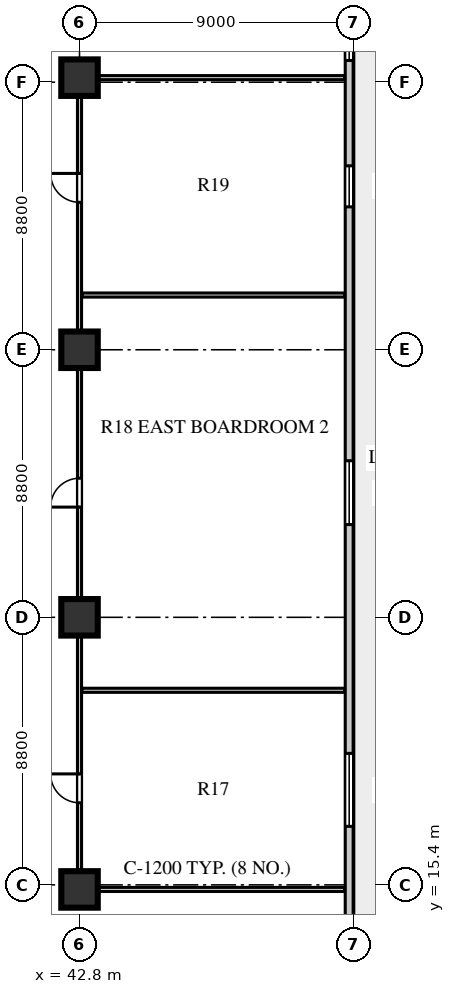
"""IFC4 building model, lengths in metres.
Left out: names, types, materials, properties, quantities, classifications, styles, units other than length and angle.
Written with IfcOpenShell. Run it as: python <this file> out.ifc"""

import sys

from ifc_helpers import new_model, si_unit, direction, frame, frame_2d, origin, origin_2d, place, context, subcontext, project, spatial, rectangle, extrude, element, fill, save


model = new_model("IFC4")
c1 = context("Model", 3, precision=1e-05, world=origin(), true_north=direction((0.0, 1.0)))
c2 = subcontext(c1, "Body", "Model", "MODEL_VIEW")
j1 = project(units=[si_unit("LENGTHUNIT", "METRE"), si_unit("PLANEANGLEUNIT", "RADIAN")], contexts=[c1])
p1 = place(None, origin())
s1 = spatial("IfcSite", under=j1, at=p1, CompositionType="ELEMENT")
p2 = place(p1, origin())
s2 = spatial("IfcBuilding", under=s1, at=p2, CompositionType="ELEMENT")
p3 = place(p2, frame((0.0, 0.0, 42.0)))
s3 = spatial("IfcBuildingStorey", under=s2, at=p3, CompositionType="ELEMENT", Elevation=42.0)
for number, where, z_axis, x_axis in (
    (1, (42.8, 15.25, 0.0), (0.0, 0.0, 1.0), (1.0, 0.0, 0.0)),
    (2, (42.8, 24.2, 0.0), (0.0, 0.0, 1.0), (1.0, 0.0, 0.0)),
    (3, (42.8, 33.0, 0.0), (0.0, 0.0, 1.0), (1.0, 0.0, 0.0)),
    (4, (42.8, 41.95, 0.0), (0.0, 0.0, 1.0), (1.0, 0.0, 0.0)),
):
    element("IfcColumn", number, at=place(p3, frame(where, z_axis=z_axis, x_axis=x_axis)), inside=s3, PredefinedType="COLUMN", context=c2, shape_type="SweptSolid", body=[
        extrude(rectangle(XDim=1.2, YDim=1.2, at=origin_2d()), origin(), (0.0, 0.0, 1.0), 3.72),
    ])
p4 = place(p3, frame((51.67, 12.36, 0.0), z_axis=(0.0, 0.0, 1.0), x_axis=(0.0, 1.0, 0.0)))
e5 = element("IfcWall", 5, at=p4, inside=s3, PredefinedType="SOLIDWALL", context=c2, shape_type="SweptSolid", body=[
    extrude(rectangle(XDim=32.48, YDim=0.26, at=frame_2d((16.24, 0.0))), origin(), (0.0, 0.0, 1.0), 3.72),
])
p5 = place(p4, frame((0.69, 0.0, 0.0)))
e6 = element("IfcOpeningElement", 6, at=p5, cuts=e5, PredefinedType="OPENING", context=c2, shape_type="SweptSolid", body=[
    extrude(rectangle(XDim=1.0, YDim=2.05, at=frame_2d((0.5, 1.025))), frame((0.0, 0.14, 0.0), z_axis=(0.0, -1.0, 0.0), x_axis=(1.0, 0.0, 0.0)), (0.0, 0.0, 1.0), 0.28),
])
p6 = place(p4, frame((4.965, 0.0, 0.8)))
e7 = element("IfcOpeningElement", 7, at=p6, cuts=e5, PredefinedType="OPENING", context=c2, shape_type="SweptSolid", body=[
    extrude(rectangle(XDim=2.4, YDim=2.05, at=frame_2d((1.2, 1.025))), frame((0.0, 0.14, 0.0), z_axis=(0.0, -1.0, 0.0), x_axis=(1.0, 0.0, 0.0)), (0.0, 0.0, 1.0), 0.28),
])
p7 = place(p4, frame((14.89, 0.0, 0.8)))
e8 = element("IfcOpeningElement", 8, at=p7, cuts=e5, PredefinedType="OPENING", context=c2, shape_type="SweptSolid", body=[
    extrude(rectangle(XDim=2.1, YDim=1.95, at=frame_2d((1.05, 0.975))), frame((0.0, 0.14, 0.0), z_axis=(0.0, -1.0, 0.0), x_axis=(1.0, 0.0, 0.0)), (0.0, 0.0, 1.0), 0.28),
])
p8 = place(p4, frame((25.34, 0.0, 0.8)))
e9 = element("IfcOpeningElement", 9, at=p8, cuts=e5, PredefinedType="OPENING", context=c2, shape_type="SweptSolid", body=[
    extrude(rectangle(XDim=1.35, YDim=1.9, at=frame_2d((0.675, 0.95))), frame((0.0, 0.14, 0.0), z_axis=(0.0, -1.0, 0.0), x_axis=(1.0, 0.0, 0.0)), (0.0, 0.0, 1.0), 0.28),
])
p9 = place(p4, frame((30.155, 0.0, 0.8)))
e10 = element("IfcOpeningElement", 10, at=p9, cuts=e5, PredefinedType="OPENING", context=c2, shape_type="SweptSolid", body=[
    extrude(rectangle(XDim=1.65, YDim=1.95, at=frame_2d((0.825, 0.975))), frame((0.0, 0.14, 0.0), z_axis=(0.0, -1.0, 0.0), x_axis=(1.0, 0.0, 0.0)), (0.0, 0.0, 1.0), 0.28),
])
p10 = place(p3, frame((42.8, 15.25, 0.0), z_axis=(0.0, 0.0, 1.0), x_axis=(0.0, 1.0, 0.0)))
e11 = element("IfcWall", 11, at=p10, inside=s3, PredefinedType="PARTITIONING", context=c2, shape_type="SweptSolid", body=[
    extrude(rectangle(XDim=26.7, YDim=0.135, at=frame_2d((13.35, 0.0))), origin(), (0.0, 0.0, 1.0), 3.02),
])
p11 = place(p10, frame((2.85, 0.0, 0.0)))
e12 = element("IfcOpeningElement", 12, at=p11, cuts=e11, PredefinedType="OPENING", context=c2, shape_type="SweptSolid", body=[
    extrude(rectangle(XDim=0.95, YDim=2.08, at=frame_2d((0.475, 1.04))), frame((0.0, 0.078, 0.0), z_axis=(0.0, -1.0, 0.0), x_axis=(1.0, 0.0, 0.0)), (0.0, 0.0, 1.0), 0.155),
])
p12 = place(p10, frame((12.575, 0.0, 0.0)))
e13 = element("IfcOpeningElement", 13, at=p12, cuts=e11, PredefinedType="OPENING", context=c2, shape_type="SweptSolid", body=[
    extrude(rectangle(XDim=0.95, YDim=2.08, at=frame_2d((0.475, 1.04))), frame((0.0, 0.078, 0.0), z_axis=(0.0, -1.0, 0.0), x_axis=(1.0, 0.0, 0.0)), (0.0, 0.0, 1.0), 0.155),
])
p13 = place(p10, frame((22.6, 0.0, 0.0)))
e14 = element("IfcOpeningElement", 14, at=p13, cuts=e11, PredefinedType="OPENING", context=c2, shape_type="SweptSolid", body=[
    extrude(rectangle(XDim=0.95, YDim=2.08, at=frame_2d((0.475, 1.04))), frame((0.0, 0.078, 0.0), z_axis=(0.0, -1.0, 0.0), x_axis=(1.0, 0.0, 0.0)), (0.0, 0.0, 1.0), 0.155),
])
for number, where, z_axis, x_axis in (
    (15, (42.88, 15.25, 0.0), (0.0, 0.0, 1.0), (1.0, 0.0, 0.0)),
    (16, (42.88, 41.95, 0.0), (0.0, 0.0, 1.0), (1.0, 0.0, 0.0)),
):
    element("IfcWall", number, at=place(p3, frame(where, z_axis=z_axis, x_axis=x_axis)), inside=s3, PredefinedType="PARTITIONING", context=c2, shape_type="SweptSolid", body=[
        extrude(rectangle(XDim=8.64, YDim=0.135, at=frame_2d((4.32, 0.0))), origin(), (0.0, 0.0, 1.0), 3.22),
    ])
for number, where, z_axis, x_axis in (
    (17, (42.88, 21.8, 0.0), (0.0, 0.0, 1.0), (1.0, 0.0, 0.0)),
    (18, (42.88, 34.8, 0.0), (0.0, 0.0, 1.0), (1.0, 0.0, 0.0)),
):
    element("IfcWall", number, at=place(p3, frame(where, z_axis=z_axis, x_axis=x_axis)), inside=s3, PredefinedType="PARTITIONING", context=c2, shape_type="SweptSolid", body=[
        extrude(rectangle(XDim=8.64, YDim=0.135, at=frame_2d((4.32, 0.0))), origin(), (0.0, 0.0, 1.0), 3.72),
    ])
p14 = place(p6, origin())
e19 = element("IfcWindow", 19, at=p14, inside=s3, PartitioningType="SINGLE_PANEL", PredefinedType="WINDOW", context=c2, shape_type="SweptSolid", body=[
    extrude(rectangle(XDim=2.4, YDim=2.05, at=frame_2d((1.2, 1.025))), frame((0.0, 0.03, 0.0), z_axis=(0.0, -1.0, 0.0), x_axis=(1.0, 0.0, 0.0)), (0.0, 0.0, 1.0), 0.06),
])
fill(e7, e19)
p15 = place(p7, origin())
e20 = element("IfcWindow", 20, at=p15, inside=s3, PartitioningType="SINGLE_PANEL", PredefinedType="WINDOW", context=c2, shape_type="SweptSolid", body=[
    extrude(rectangle(XDim=2.1, YDim=1.95, at=frame_2d((1.05, 0.975))), frame((0.0, 0.03, 0.0), z_axis=(0.0, -1.0, 0.0), x_axis=(1.0, 0.0, 0.0)), (0.0, 0.0, 1.0), 0.06),
])
fill(e8, e20)
p16 = place(p8, origin())
e21 = element("IfcWindow", 21, at=p16, inside=s3, PartitioningType="SINGLE_PANEL", PredefinedType="WINDOW", context=c2, shape_type="SweptSolid", body=[
    extrude(rectangle(XDim=1.35, YDim=1.9, at=frame_2d((0.675, 0.95))), frame((0.0, 0.03, 0.0), z_axis=(0.0, -1.0, 0.0), x_axis=(1.0, 0.0, 0.0)), (0.0, 0.0, 1.0), 0.06),
])
fill(e9, e21)
p17 = place(p9, origin())
e22 = element("IfcWindow", 22, at=p17, inside=s3, PartitioningType="SINGLE_PANEL", PredefinedType="WINDOW", context=c2, shape_type="SweptSolid", body=[
    extrude(rectangle(XDim=1.65, YDim=1.95, at=frame_2d((0.825, 0.975))), frame((0.0, 0.03, 0.0), z_axis=(0.0, -1.0, 0.0), x_axis=(1.0, 0.0, 0.0)), (0.0, 0.0, 1.0), 0.06),
])
fill(e10, e22)
p18 = place(p11, origin())
e23 = element("IfcDoor", 23, at=p18, inside=s3, OperationType="SINGLE_SWING_RIGHT", PredefinedType="DOOR", context=c2, shape_type="SweptSolid", body=[
    extrude(rectangle(XDim=0.95, YDim=2.08, at=frame_2d((0.475, 1.04))), frame((0.0, 0.025, 0.0), z_axis=(0.0, -1.0, 0.0), x_axis=(1.0, 0.0, 0.0)), (0.0, 0.0, 1.0), 0.05),
])
fill(e12, e23)
p19 = place(p12, origin())
e24 = element("IfcDoor", 24, at=p19, inside=s3, OperationType="SINGLE_SWING_LEFT", PredefinedType="DOOR", context=c2, shape_type="SweptSolid", body=[
    extrude(rectangle(XDim=0.95, YDim=2.08, at=frame_2d((0.475, 1.04))), frame((0.0, 0.025, 0.0), z_axis=(0.0, -1.0, 0.0), x_axis=(1.0, 0.0, 0.0)), (0.0, 0.0, 1.0), 0.05),
])
fill(e13, e24)
p20 = place(p13, origin())
e25 = element("IfcDoor", 25, at=p20, inside=s3, OperationType="SINGLE_SWING_RIGHT", PredefinedType="DOOR", context=c2, shape_type="SweptSolid", body=[
    extrude(rectangle(XDim=0.95, YDim=2.08, at=frame_2d((0.475, 1.04))), frame((0.0, 0.025, 0.0), z_axis=(0.0, -1.0, 0.0), x_axis=(1.0, 0.0, 0.0)), (0.0, 0.0, 1.0), 0.05),
])
fill(e14, e25)
save(model, sys.argv[1])
